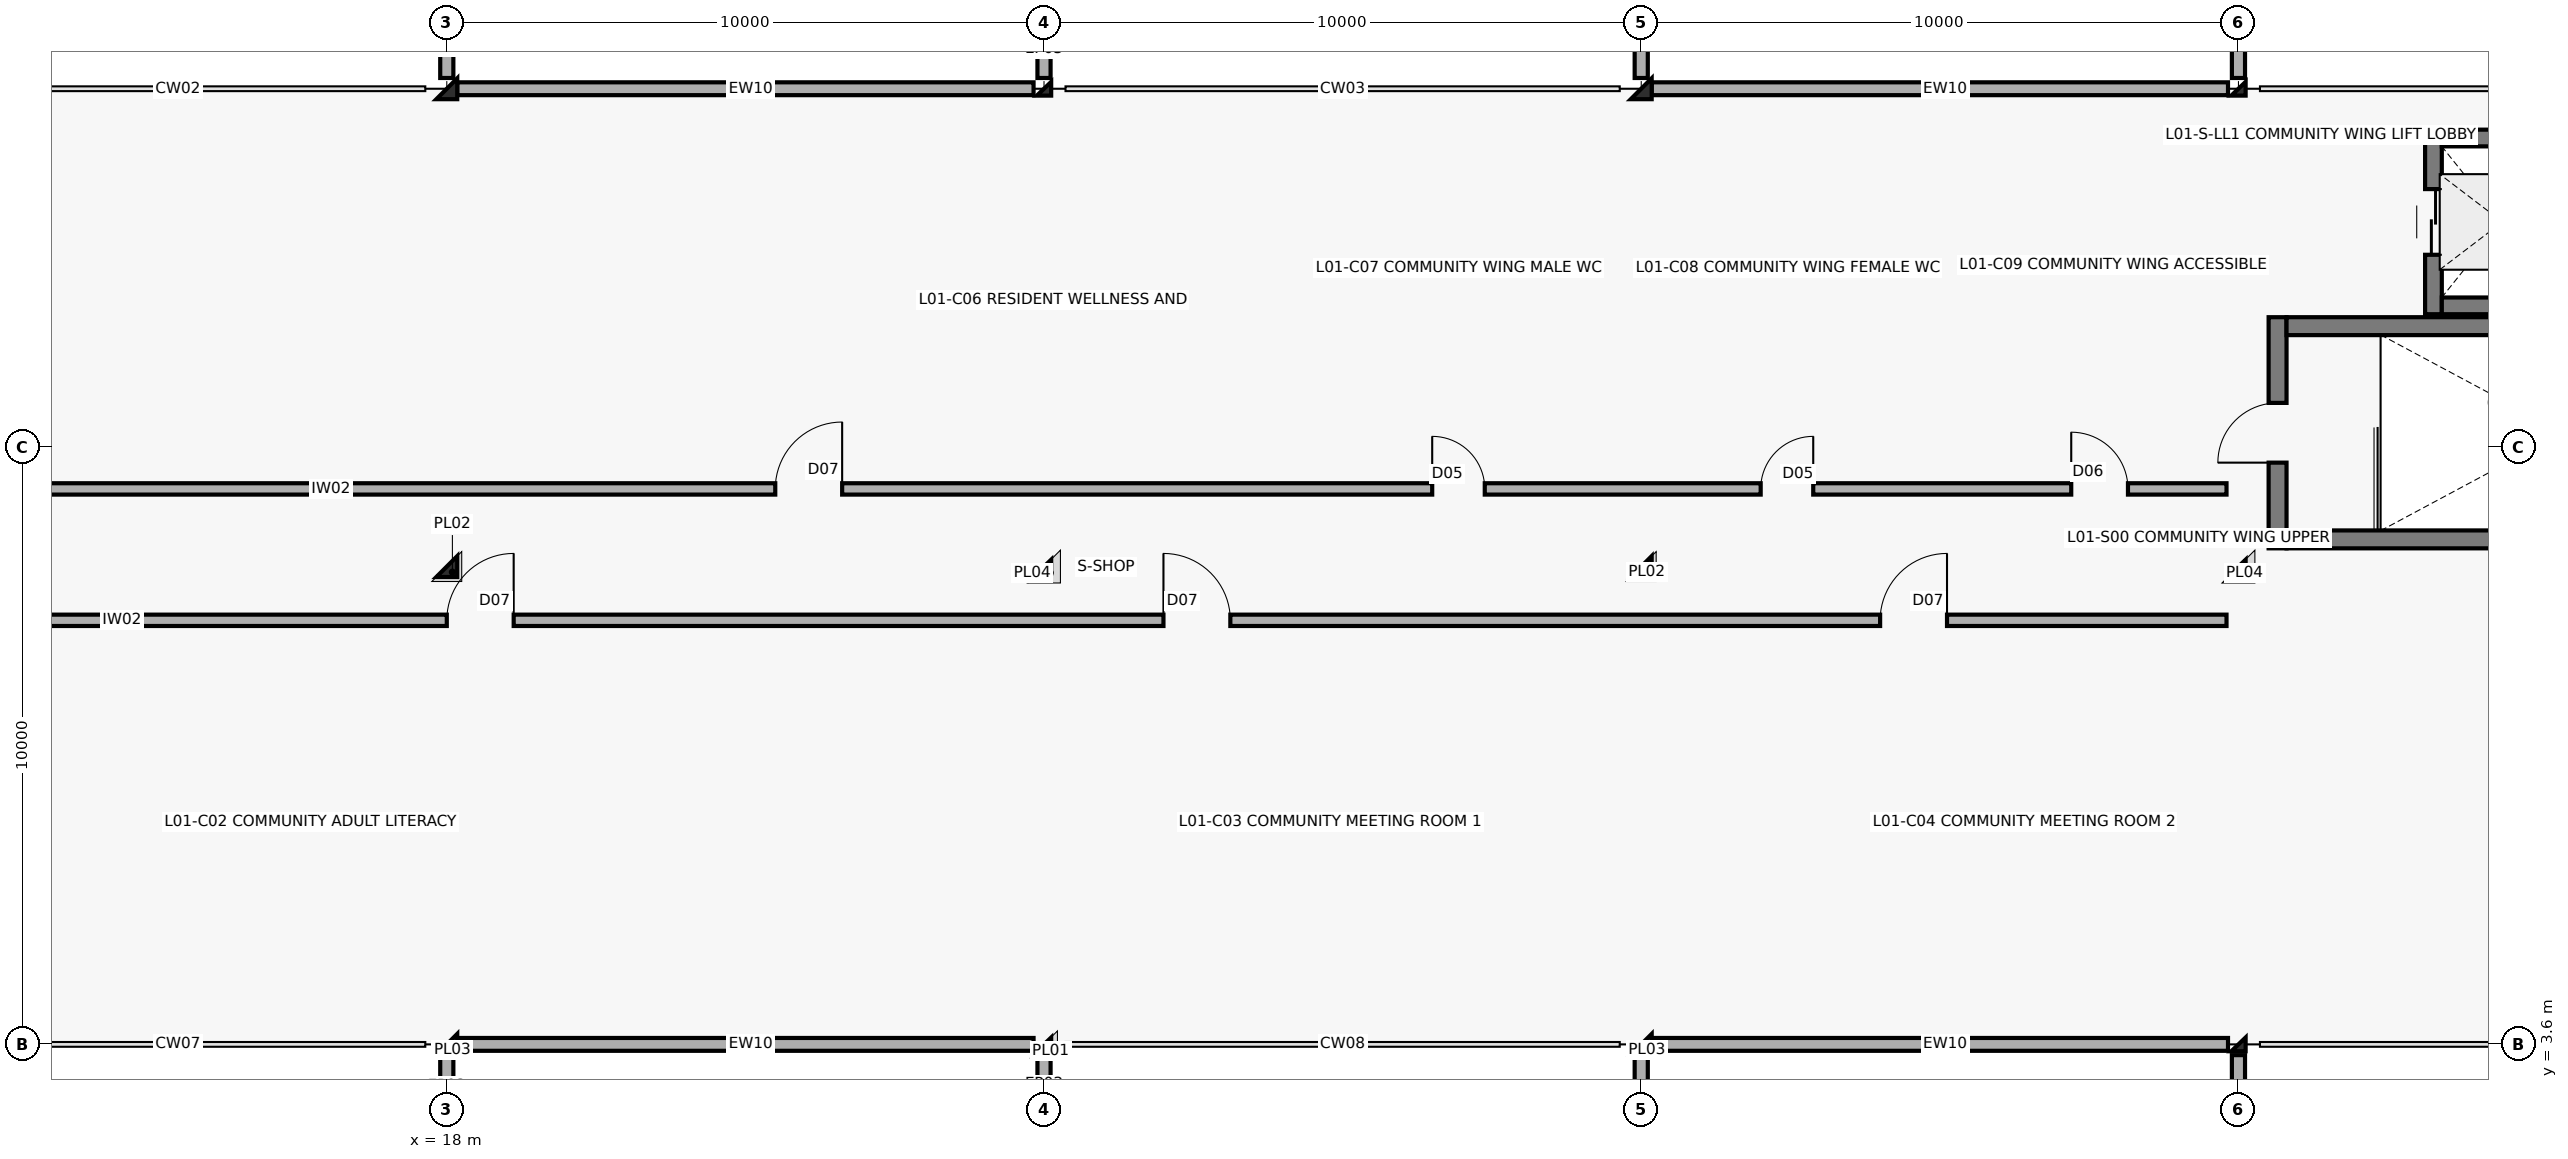
"""IFC4 building model, lengths in metres.
Left out: names, types, materials, properties, quantities, classifications, styles, units other than length and angle.
Written with IfcOpenShell. Run it as: python <this file> out.ifc"""

import sys

from ifc_helpers import new_model, si_unit, direction, frame, frame_2d, origin, origin_2d, place, context, subcontext, project, spatial, rectangle, i_section, extrude, element, fill, save


model = new_model("IFC4")
c1 = context("Model", 3, precision=1e-05, world=origin(), true_north=direction((0.0, 1.0)))
c2 = subcontext(c1, "Body", "Model", "MODEL_VIEW")
j1 = project(units=[si_unit("LENGTHUNIT", "METRE"), si_unit("PLANEANGLEUNIT", "RADIAN")], contexts=[c1])
p1 = place(None, origin())
s1 = spatial("IfcSite", under=j1, at=p1, CompositionType="ELEMENT")
p2 = place(p1, origin())
s2 = spatial("IfcBuilding", under=s1, at=p2, CompositionType="ELEMENT")
p3 = place(p2, frame((0.0, 0.0, 4.5)))
s3 = spatial("IfcBuildingStorey", under=s2, at=p3, CompositionType="ELEMENT", Elevation=4.5)
for number, where, z_axis, x_axis in (
    (1, (18.0, 3.6, 0.0), (0.0, 0.0, 1.0), (1.0, 0.0, 0.0)),
    (2, (18.0, 11.6, 0.0), (0.0, 0.0, 1.0), (1.0, 0.0, 0.0)),
    (3, (18.0, 19.6, 0.0), (0.0, 0.0, 1.0), (1.0, 0.0, 0.0)),
):
    element("IfcColumn", number, at=place(p3, frame(where, z_axis=z_axis, x_axis=x_axis)), inside=s3, PredefinedType="COLUMN", context=c2, shape_type="SweptSolid", body=[
        extrude(rectangle(XDim=0.35, YDim=0.35, at=origin_2d()), origin(), (0.0, 0.0, 1.0), 3.2),
    ])
for number, where, z_axis, x_axis in (
    (4, (28.0, 3.6, 0.0), (0.0, 0.0, 1.0), (1.0, 0.0, 0.0)),
    (5, (28.0, 11.6, 0.0), (0.0, 0.0, 1.0), (1.0, 0.0, 0.0)),
    (6, (28.0, 19.6, 0.0), (0.0, 0.0, 1.0), (1.0, 0.0, 0.0)),
):
    element("IfcColumn", number, at=place(p3, frame(where, z_axis=z_axis, x_axis=x_axis)), inside=s3, PredefinedType="COLUMN", context=c2, shape_type="SweptSolid", body=[
        extrude(i_section(OverallWidth=0.24, OverallDepth=0.23, WebThickness=0.008, FlangeThickness=0.012, FilletRadius=0.021, at=origin_2d()), origin(), (0.0, 0.0, 1.0), 3.2),
    ])
for number, where, z_axis, x_axis in (
    (7, (38.0, 3.6, 0.0), (0.0, 0.0, 1.0), (1.0, 0.0, 0.0)),
    (8, (38.0, 11.6, 0.0), (0.0, 0.0, 1.0), (1.0, 0.0, 0.0)),
    (9, (38.0, 19.6, 0.0), (0.0, 0.0, 1.0), (1.0, 0.0, 0.0)),
):
    element("IfcColumn", number, at=place(p3, frame(where, z_axis=z_axis, x_axis=x_axis)), inside=s3, PredefinedType="COLUMN", context=c2, shape_type="SweptSolid", body=[
        extrude(rectangle(XDim=0.35, YDim=0.35, at=origin_2d()), origin(), (0.0, 0.0, 1.0), 3.2),
    ])
for number, where, z_axis, x_axis in (
    (10, (48.0, 3.6, 0.0), (0.0, 0.0, 1.0), (1.0, 0.0, 0.0)),
    (11, (48.0, 11.6, 0.0), (0.0, 0.0, 1.0), (1.0, 0.0, 0.0)),
    (12, (48.0, 19.6, 0.0), (0.0, 0.0, 1.0), (1.0, 0.0, 0.0)),
):
    element("IfcColumn", number, at=place(p3, frame(where, z_axis=z_axis, x_axis=x_axis)), inside=s3, PredefinedType="COLUMN", context=c2, shape_type="SweptSolid", body=[
        extrude(i_section(OverallWidth=0.24, OverallDepth=0.23, WebThickness=0.008, FlangeThickness=0.012, FilletRadius=0.021, at=origin_2d()), origin(), (0.0, 0.0, 1.0), 3.2),
    ])
for number, where, z_axis, x_axis in (
    (13, (18.175, 3.6, 0.0), (0.0, 0.0, 1.0), (1.0, 0.0, 0.0)),
    (14, (38.175, 3.6, 0.0), (0.0, 0.0, 1.0), (1.0, 0.0, 0.0)),
    (15, (18.175, 19.6, 0.0), (0.0, 0.0, 1.0), (1.0, 0.0, 0.0)),
    (16, (38.175, 19.6, 0.0), (0.0, 0.0, 1.0), (1.0, 0.0, 0.0)),
):
    element("IfcWall", number, at=place(p3, frame(where, z_axis=z_axis, x_axis=x_axis)), inside=s3, PredefinedType="SOLIDWALL", context=c2, shape_type="SweptSolid", body=[
        extrude(rectangle(XDim=9.65, YDim=0.215, at=frame_2d((4.825, 0.0))), origin(), (0.0, 0.0, 1.0), 2.55),
    ])
for number, where, z_axis, x_axis in (
    (17, (18.0, 2.55, 0.0), (0.0, 0.0, 1.0), (0.0, 1.0, 0.0)),
    (18, (18.0, 19.78, 0.0), (0.0, 0.0, 1.0), (0.0, 1.0, 0.0)),
    (19, (28.0, 2.55, 0.0), (0.0, 0.0, 1.0), (0.0, 1.0, 0.0)),
    (20, (28.0, 19.78, 0.0), (0.0, 0.0, 1.0), (0.0, 1.0, 0.0)),
    (21, (38.0, 2.55, 0.0), (0.0, 0.0, 1.0), (0.0, 1.0, 0.0)),
    (22, (38.0, 19.78, 0.0), (0.0, 0.0, 1.0), (0.0, 1.0, 0.0)),
    (23, (48.0, 2.55, 0.0), (0.0, 0.0, 1.0), (0.0, 1.0, 0.0)),
    (24, (48.0, 19.78, 0.0), (0.0, 0.0, 1.0), (0.0, 1.0, 0.0)),
):
    element("IfcWall", number, at=place(p3, frame(where, z_axis=z_axis, x_axis=x_axis)), inside=s3, PredefinedType="PARAPET", context=c2, shape_type="SweptSolid", body=[
        extrude(rectangle(XDim=0.87, YDim=0.22, at=frame_2d((0.435, 0.0))), origin(), (0.0, 0.0, 1.0), 3.0),
    ])
p4 = place(p3, frame((48.655, 11.905, 0.0), z_axis=(0.0, 0.0, 1.0), x_axis=(0.0, 1.0, 0.0)))
e25 = element("IfcWall", 25, at=p4, inside=s3, PredefinedType="SHEAR", context=c2, shape_type="SweptSolid", body=[
    extrude(rectangle(XDim=3.87, YDim=0.3, at=frame_2d((1.935, 0.0))), origin(), (0.0, 0.0, 1.0), 3.6),
])
p5 = place(p4, frame((1.435, 0.0, 0.0)))
e26 = element("IfcOpeningElement", 26, at=p5, cuts=e25, PredefinedType="OPENING", context=c2, shape_type="SweptSolid", body=[
    extrude(rectangle(XDim=1.0, YDim=2.15, at=frame_2d((0.5, 1.075))), frame((0.0, 0.16, 0.0), z_axis=(0.0, -1.0, 0.0), x_axis=(1.0, 0.0, 0.0)), (0.0, 0.0, 1.0), 0.32),
])
for number, where, z_axis, x_axis in (
    (27, (48.805, 12.055, 0.0), (0.0, 0.0, 1.0), (1.0, 0.0, 0.0)),
    (28, (48.805, 15.625, 0.0), (0.0, 0.0, 1.0), (1.0, 0.0, 0.0)),
):
    element("IfcWall", number, at=place(p3, frame(where, z_axis=z_axis, x_axis=x_axis)), inside=s3, PredefinedType="SHEAR", context=c2, shape_type="SweptSolid", body=[
        extrude(rectangle(XDim=7.69, YDim=0.3, at=frame_2d((3.845, 0.0))), origin(), (0.0, 0.0, 1.0), 3.6),
    ])
p6 = place(p3, frame((51.265, 15.825, 0.0), z_axis=(0.0, 0.0, 1.0), x_axis=(0.0, 1.0, 0.0)))
e29 = element("IfcWall", 29, at=p6, inside=s3, PredefinedType="SHEAR", context=c2, shape_type="SweptSolid", body=[
    extrude(rectangle(XDim=3.09, YDim=0.28, at=frame_2d((1.545, 0.0))), origin(), (0.0, 0.0, 1.0), 3.6),
])
p7 = place(p6, frame((0.995, 0.0, 0.0)))
e30 = element("IfcOpeningElement", 30, at=p7, cuts=e29, PredefinedType="OPENING", context=c2, shape_type="SweptSolid", body=[
    extrude(rectangle(XDim=1.1, YDim=2.15, at=frame_2d((0.55, 1.075))), frame((0.0, 0.15, 0.0), z_axis=(0.0, -1.0, 0.0), x_axis=(1.0, 0.0, 0.0)), (0.0, 0.0, 1.0), 0.3),
])
for number, where, z_axis, x_axis in (
    (31, (51.405, 15.965, 0.0), (0.0, 0.0, 1.0), (1.0, 0.0, 0.0)),
    (32, (51.405, 18.775, 0.0), (0.0, 0.0, 1.0), (1.0, 0.0, 0.0)),
):
    element("IfcWall", number, at=place(p3, frame(where, z_axis=z_axis, x_axis=x_axis)), inside=s3, PredefinedType="SHEAR", context=c2, shape_type="SweptSolid", body=[
        extrude(rectangle(XDim=2.03, YDim=0.28, at=frame_2d((1.015, 0.0))), origin(), (0.0, 0.0, 1.0), 3.6),
    ])
p8 = place(p3, frame((1.0, 10.7, 0.0), z_axis=(0.0, 0.0, 1.0), x_axis=(1.0, 0.0, 0.0)))
e33 = element("IfcWall", 33, at=p8, inside=s3, PredefinedType="SOLIDWALL", context=c2, shape_type="SweptSolid", body=[
    extrude(rectangle(XDim=46.8, YDim=0.19, at=frame_2d((23.4, 0.0))), origin(), (0.0, 0.0, 1.0), 2.3),
])
p9 = place(p8, frame((5.0, 0.0, 0.0)))
e34 = element("IfcOpeningElement", 34, at=p9, cuts=e33, PredefinedType="OPENING", context=c2, shape_type="SweptSolid", body=[
    extrude(rectangle(XDim=1.12, YDim=2.15, at=frame_2d((0.56, 1.075))), frame((0.0, 0.105, 0.0), z_axis=(0.0, -1.0, 0.0), x_axis=(1.0, 0.0, 0.0)), (0.0, 0.0, 1.0), 0.21),
])
p10 = place(p8, frame((17.0, 0.0, 0.0)))
e35 = element("IfcOpeningElement", 35, at=p10, cuts=e33, PredefinedType="OPENING", context=c2, shape_type="SweptSolid", body=[
    extrude(rectangle(XDim=1.12, YDim=2.15, at=frame_2d((0.56, 1.075))), frame((0.0, 0.105, 0.0), z_axis=(0.0, -1.0, 0.0), x_axis=(1.0, 0.0, 0.0)), (0.0, 0.0, 1.0), 0.21),
])
p11 = place(p8, frame((29.0, 0.0, 0.0)))
e36 = element("IfcOpeningElement", 36, at=p11, cuts=e33, PredefinedType="OPENING", context=c2, shape_type="SweptSolid", body=[
    extrude(rectangle(XDim=1.12, YDim=2.15, at=frame_2d((0.56, 1.075))), frame((0.0, 0.105, 0.0), z_axis=(0.0, -1.0, 0.0), x_axis=(1.0, 0.0, 0.0)), (0.0, 0.0, 1.0), 0.21),
])
p12 = place(p8, frame((41.0, 0.0, 0.0)))
e37 = element("IfcOpeningElement", 37, at=p12, cuts=e33, PredefinedType="OPENING", context=c2, shape_type="SweptSolid", body=[
    extrude(rectangle(XDim=1.12, YDim=2.15, at=frame_2d((0.56, 1.075))), frame((0.0, 0.105, 0.0), z_axis=(0.0, -1.0, 0.0), x_axis=(1.0, 0.0, 0.0)), (0.0, 0.0, 1.0), 0.21),
])
p13 = place(p3, frame((1.0, 12.9, 0.0), z_axis=(0.0, 0.0, 1.0), x_axis=(1.0, 0.0, 0.0)))
e38 = element("IfcWall", 38, at=p13, inside=s3, PredefinedType="SOLIDWALL", context=c2, shape_type="SweptSolid", body=[
    extrude(rectangle(XDim=46.8, YDim=0.19, at=frame_2d((23.4, 0.0))), origin(), (0.0, 0.0, 1.0), 2.3),
])
p14 = place(p13, frame((6.5, 0.0, 0.0)))
e39 = element("IfcOpeningElement", 39, at=p14, cuts=e38, PredefinedType="OPENING", context=c2, shape_type="SweptSolid", body=[
    extrude(rectangle(XDim=1.12, YDim=2.15, at=frame_2d((0.56, 1.075))), frame((0.0, 0.105, 0.0), z_axis=(0.0, -1.0, 0.0), x_axis=(1.0, 0.0, 0.0)), (0.0, 0.0, 1.0), 0.21),
])
p15 = place(p13, frame((22.5, 0.0, 0.0)))
e40 = element("IfcOpeningElement", 40, at=p15, cuts=e38, PredefinedType="OPENING", context=c2, shape_type="SweptSolid", body=[
    extrude(rectangle(XDim=1.12, YDim=2.15, at=frame_2d((0.56, 1.075))), frame((0.0, 0.105, 0.0), z_axis=(0.0, -1.0, 0.0), x_axis=(1.0, 0.0, 0.0)), (0.0, 0.0, 1.0), 0.21),
])
p16 = place(p13, frame((33.5, 0.0, 0.0)))
e41 = element("IfcOpeningElement", 41, at=p16, cuts=e38, PredefinedType="OPENING", context=c2, shape_type="SweptSolid", body=[
    extrude(rectangle(XDim=0.88, YDim=2.1, at=frame_2d((0.44, 1.05))), frame((0.0, 0.105, 0.0), z_axis=(0.0, -1.0, 0.0), x_axis=(1.0, 0.0, 0.0)), (0.0, 0.0, 1.0), 0.21),
])
p17 = place(p13, frame((39.0, 0.0, 0.0)))
e42 = element("IfcOpeningElement", 42, at=p17, cuts=e38, PredefinedType="OPENING", context=c2, shape_type="SweptSolid", body=[
    extrude(rectangle(XDim=0.88, YDim=2.1, at=frame_2d((0.44, 1.05))), frame((0.0, 0.105, 0.0), z_axis=(0.0, -1.0, 0.0), x_axis=(1.0, 0.0, 0.0)), (0.0, 0.0, 1.0), 0.21),
])
p18 = place(p13, frame((44.2, 0.0, 0.0)))
e43 = element("IfcOpeningElement", 43, at=p18, cuts=e38, PredefinedType="OPENING", context=c2, shape_type="SweptSolid", body=[
    extrude(rectangle(XDim=0.95, YDim=2.1, at=frame_2d((0.475, 1.05))), frame((0.0, 0.105, 0.0), z_axis=(0.0, -1.0, 0.0), x_axis=(1.0, 0.0, 0.0)), (0.0, 0.0, 1.0), 0.21),
])
p19 = place(p5, origin())
e44 = element("IfcDoor", 44, at=p19, inside=s3, OperationType="SINGLE_SWING_LEFT", PredefinedType="DOOR", context=c2, shape_type="SweptSolid", body=[
    extrude(rectangle(XDim=1.0, YDim=2.15, at=frame_2d((0.5, 1.075))), frame((0.0, 0.025, 0.0), z_axis=(0.0, -1.0, 0.0), x_axis=(1.0, 0.0, 0.0)), (0.0, 0.0, 1.0), 0.05),
])
fill(e26, e44)
p20 = place(p7, origin())
e45 = element("IfcDoor", 45, at=p20, inside=s3, OperationType="DOUBLE_DOOR_SLIDING", PredefinedType="DOOR", context=c2, shape_type="SweptSolid", body=[
    extrude(rectangle(XDim=1.1, YDim=2.15, at=frame_2d((0.55, 1.075))), frame((0.0, 0.025, 0.0), z_axis=(0.0, -1.0, 0.0), x_axis=(1.0, 0.0, 0.0)), (0.0, 0.0, 1.0), 0.05),
])
fill(e30, e45)
p21 = place(p10, origin())
e46 = element("IfcDoor", 46, at=p21, inside=s3, OperationType="SINGLE_SWING_RIGHT", PredefinedType="DOOR", context=c2, shape_type="SweptSolid", body=[
    extrude(rectangle(XDim=1.12, YDim=2.15, at=frame_2d((0.56, 1.075))), frame((0.0, 0.025, 0.0), z_axis=(0.0, -1.0, 0.0), x_axis=(1.0, 0.0, 0.0)), (0.0, 0.0, 1.0), 0.05),
])
fill(e35, e46)
p22 = place(p11, origin())
e47 = element("IfcDoor", 47, at=p22, inside=s3, OperationType="SINGLE_SWING_LEFT", PredefinedType="DOOR", context=c2, shape_type="SweptSolid", body=[
    extrude(rectangle(XDim=1.12, YDim=2.15, at=frame_2d((0.56, 1.075))), frame((0.0, 0.025, 0.0), z_axis=(0.0, -1.0, 0.0), x_axis=(1.0, 0.0, 0.0)), (0.0, 0.0, 1.0), 0.05),
])
fill(e36, e47)
p23 = place(p12, origin())
e48 = element("IfcDoor", 48, at=p23, inside=s3, OperationType="SINGLE_SWING_RIGHT", PredefinedType="DOOR", context=c2, shape_type="SweptSolid", body=[
    extrude(rectangle(XDim=1.12, YDim=2.15, at=frame_2d((0.56, 1.075))), frame((0.0, 0.025, 0.0), z_axis=(0.0, -1.0, 0.0), x_axis=(1.0, 0.0, 0.0)), (0.0, 0.0, 1.0), 0.05),
])
fill(e37, e48)
p24 = place(p15, origin())
e49 = element("IfcDoor", 49, at=p24, inside=s3, OperationType="SINGLE_SWING_RIGHT", PredefinedType="DOOR", context=c2, shape_type="SweptSolid", body=[
    extrude(rectangle(XDim=1.12, YDim=2.15, at=frame_2d((0.56, 1.075))), frame((0.0, 0.025, 0.0), z_axis=(0.0, -1.0, 0.0), x_axis=(1.0, 0.0, 0.0)), (0.0, 0.0, 1.0), 0.05),
])
fill(e40, e49)
p25 = place(p16, origin())
e50 = element("IfcDoor", 50, at=p25, inside=s3, OperationType="SINGLE_SWING_LEFT", PredefinedType="DOOR", context=c2, shape_type="SweptSolid", body=[
    extrude(rectangle(XDim=0.88, YDim=2.1, at=frame_2d((0.44, 1.05))), frame((0.0, 0.025, 0.0), z_axis=(0.0, -1.0, 0.0), x_axis=(1.0, 0.0, 0.0)), (0.0, 0.0, 1.0), 0.05),
])
fill(e41, e50)
p26 = place(p17, origin())
e51 = element("IfcDoor", 51, at=p26, inside=s3, OperationType="SINGLE_SWING_RIGHT", PredefinedType="DOOR", context=c2, shape_type="SweptSolid", body=[
    extrude(rectangle(XDim=0.88, YDim=2.1, at=frame_2d((0.44, 1.05))), frame((0.0, 0.025, 0.0), z_axis=(0.0, -1.0, 0.0), x_axis=(1.0, 0.0, 0.0)), (0.0, 0.0, 1.0), 0.05),
])
fill(e42, e51)
p27 = place(p18, origin())
e52 = element("IfcDoor", 52, at=p27, inside=s3, OperationType="SINGLE_SWING_LEFT", PredefinedType="DOOR", context=c2, shape_type="SweptSolid", body=[
    extrude(rectangle(XDim=0.95, YDim=2.1, at=frame_2d((0.475, 1.05))), frame((0.0, 0.025, 0.0), z_axis=(0.0, -1.0, 0.0), x_axis=(1.0, 0.0, 0.0)), (0.0, 0.0, 1.0), 0.05),
])
fill(e43, e52)
save(model, sys.argv[1])
